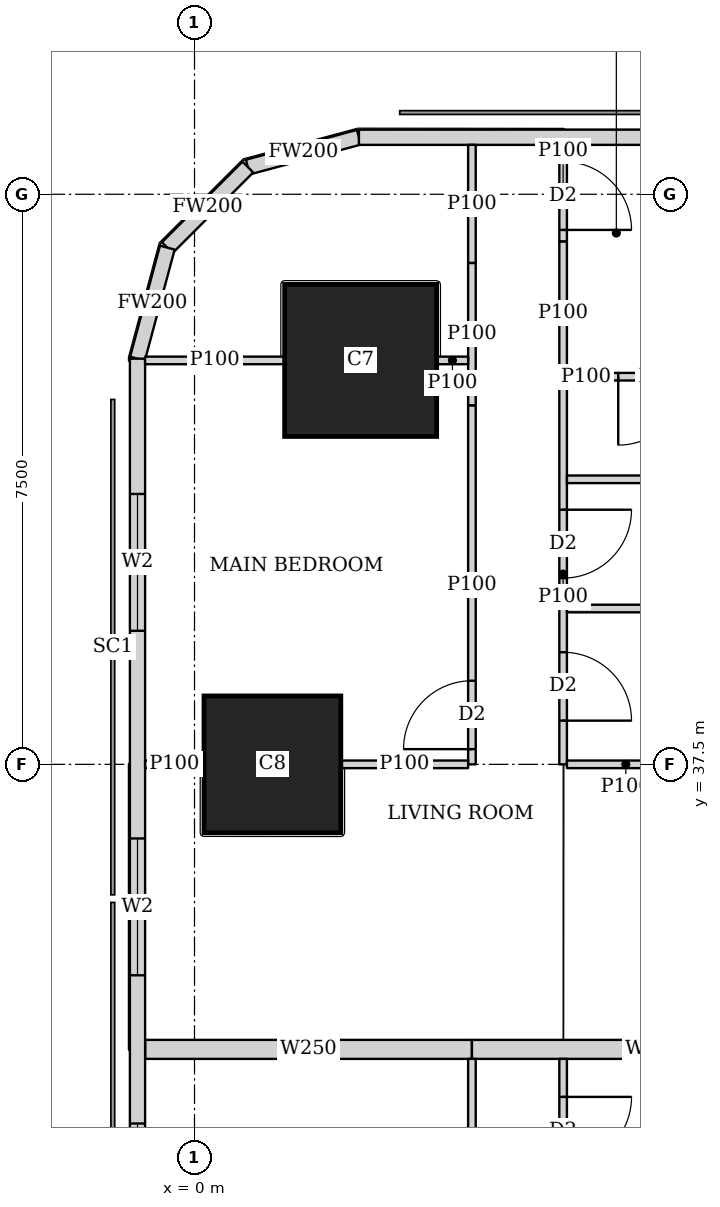
"""IFC4 building model, lengths in metres.
Left out: names, types, materials, properties, quantities, classifications, styles, units other than length and angle.
Written with IfcOpenShell. Run it as: python <this file> out.ifc"""

import sys

from ifc_helpers import new_model, si_unit, direction, frame, frame_2d, origin, origin_2d, place, context, subcontext, project, spatial, rectangle, extrude, element, fill, save


model = new_model("IFC4")
c1 = context("Model", 3, precision=1e-05, world=origin(), true_north=direction((0.0, 1.0)))
c2 = subcontext(c1, "Body", "Model", "MODEL_VIEW")
j1 = project(units=[si_unit("LENGTHUNIT", "METRE"), si_unit("PLANEANGLEUNIT", "RADIAN")], contexts=[c1])
p1 = place(None, origin())
s1 = spatial("IfcSite", under=j1, at=p1, CompositionType="ELEMENT")
p2 = place(p1, origin())
s2 = spatial("IfcBuilding", under=s1, at=p2, CompositionType="ELEMENT")
p3 = place(p2, frame((0.0, 0.0, 184.55)))
s3 = spatial("IfcBuildingStorey", under=s2, at=p3, CompositionType="ELEMENT", Elevation=184.55)
p4 = place(p3, frame((1.025, 37.5, 0.0), z_axis=(0.0, 0.0, 1.0), x_axis=(1.0, 0.0, 0.0)))
e1 = element("IfcColumn", 1, at=p4, inside=s3, PredefinedType="COLUMN", context=c2, shape_type="SweptSolid", body=[
    extrude(rectangle(XDim=1.8, YDim=1.8, at=origin_2d()), origin(), (0.0, 0.0, 1.0), 3.75),
])
p5 = place(p3, frame((2.186, 42.814, 0.0), z_axis=(0.0, 0.0, 1.0), x_axis=(1.0, 0.0, 0.0)))
e2 = element("IfcColumn", 2, at=p5, inside=s3, PredefinedType="COLUMN", context=c2, shape_type="SweptSolid", body=[
    extrude(rectangle(XDim=2.0, YDim=2.0, at=origin_2d()), origin(), (0.0, 0.0, 1.0), 3.75),
])
p6 = place(p3, frame((40.106, 45.75, 0.0), z_axis=(0.0, 0.0, 1.0), x_axis=(-1.0, 0.0, 0.0)))
e3 = element("IfcWall", 3, at=p6, inside=s3, PredefinedType="SOLIDWALL", context=c2, shape_type="SweptSolid", body=[
    extrude(rectangle(XDim=37.943, YDim=0.2, at=frame_2d((18.971, 0.0))), origin(), (0.0, 0.0, 1.0), 3.45),
])
p7 = place(p6, frame((8.606, 0.0, 0.9)))
e4 = element("IfcOpeningElement", 4, at=p7, cuts=e3, PredefinedType="OPENING", context=c2, shape_type="SweptSolid", body=[
    extrude(rectangle(XDim=1.8, YDim=1.5, at=frame_2d((0.9, 0.75))), frame((0.0, 0.11, 0.0), z_axis=(0.0, -1.0, 0.0), x_axis=(1.0, 0.0, 0.0)), (0.0, 0.0, 1.0), 0.22),
])
p8 = place(p6, frame((12.206, 0.0, 0.9)))
e5 = element("IfcOpeningElement", 5, at=p8, cuts=e3, PredefinedType="OPENING", context=c2, shape_type="SweptSolid", body=[
    extrude(rectangle(XDim=1.8, YDim=1.5, at=frame_2d((0.9, 0.75))), frame((0.0, 0.11, 0.0), z_axis=(0.0, -1.0, 0.0), x_axis=(1.0, 0.0, 0.0)), (0.0, 0.0, 1.0), 0.22),
])
p9 = place(p6, frame((15.806, 0.0, 0.9)))
e6 = element("IfcOpeningElement", 6, at=p9, cuts=e3, PredefinedType="OPENING", context=c2, shape_type="SweptSolid", body=[
    extrude(rectangle(XDim=1.8, YDim=1.5, at=frame_2d((0.9, 0.75))), frame((0.0, 0.11, 0.0), z_axis=(0.0, -1.0, 0.0), x_axis=(1.0, 0.0, 0.0)), (0.0, 0.0, 1.0), 0.22),
])
p10 = place(p6, frame((19.406, 0.0, 0.9)))
e7 = element("IfcOpeningElement", 7, at=p10, cuts=e3, PredefinedType="OPENING", context=c2, shape_type="SweptSolid", body=[
    extrude(rectangle(XDim=1.8, YDim=1.5, at=frame_2d((0.9, 0.75))), frame((0.0, 0.11, 0.0), z_axis=(0.0, -1.0, 0.0), x_axis=(1.0, 0.0, 0.0)), (0.0, 0.0, 1.0), 0.22),
])
p11 = place(p6, frame((23.006, 0.0, 0.9)))
e8 = element("IfcOpeningElement", 8, at=p11, cuts=e3, PredefinedType="OPENING", context=c2, shape_type="SweptSolid", body=[
    extrude(rectangle(XDim=1.8, YDim=1.5, at=frame_2d((0.9, 0.75))), frame((0.0, 0.11, 0.0), z_axis=(0.0, -1.0, 0.0), x_axis=(1.0, 0.0, 0.0)), (0.0, 0.0, 1.0), 0.22),
])
p12 = place(p6, frame((26.606, 0.0, 0.9)))
e9 = element("IfcOpeningElement", 9, at=p12, cuts=e3, PredefinedType="OPENING", context=c2, shape_type="SweptSolid", body=[
    extrude(rectangle(XDim=1.8, YDim=1.5, at=frame_2d((0.9, 0.75))), frame((0.0, 0.11, 0.0), z_axis=(0.0, -1.0, 0.0), x_axis=(1.0, 0.0, 0.0)), (0.0, 0.0, 1.0), 0.22),
])
p13 = place(p3, frame((2.163, 45.75, 0.0), z_axis=(0.0, 0.0, 1.0), x_axis=(-0.965832000415, -0.259168954497, 0.0)))
e10 = element("IfcWall", 10, at=p13, inside=s3, PredefinedType="SOLIDWALL", context=c2, shape_type="SweptSolid", body=[
    extrude(rectangle(XDim=1.513, YDim=0.2, at=frame_2d((0.756, 0.0))), origin(), (0.0, 0.0, 1.0), 3.45),
])
p14 = place(p3, frame((0.702, 45.358, 0.0), z_axis=(0.0, 0.0, 1.0), x_axis=(-0.707106781187, -0.707106781187, 0.0)))
e11 = element("IfcWall", 11, at=p14, inside=s3, PredefinedType="SOLIDWALL", context=c2, shape_type="SweptSolid", body=[
    extrude(rectangle(XDim=1.499, YDim=0.2, at=frame_2d((0.75, 0.0))), origin(), (0.0, 0.0, 1.0), 3.45),
])
p15 = place(p3, frame((-0.358, 44.298, 0.0), z_axis=(0.0, 0.0, 1.0), x_axis=(-0.259168954497, -0.965832000415, 0.0)))
e12 = element("IfcWall", 12, at=p15, inside=s3, PredefinedType="SOLIDWALL", context=c2, shape_type="SweptSolid", body=[
    extrude(rectangle(XDim=1.513, YDim=0.2, at=frame_2d((0.756, 0.0))), origin(), (0.0, 0.0, 1.0), 3.45),
])
p16 = place(p3, frame((-0.75, 42.837, 0.0), z_axis=(0.0, 0.0, 1.0), x_axis=(0.0, -1.0, 0.0)))
e13 = element("IfcWall", 13, at=p16, inside=s3, PredefinedType="SOLIDWALL", context=c2, shape_type="SweptSolid", body=[
    extrude(rectangle(XDim=40.674, YDim=0.2, at=frame_2d((20.337, 0.0))), origin(), (0.0, 0.0, 1.0), 3.45),
])
p17 = place(p16, frame((1.78, 0.0, 0.9)))
e14 = element("IfcOpeningElement", 14, at=p17, cuts=e13, PredefinedType="OPENING", context=c2, shape_type="SweptSolid", body=[
    extrude(rectangle(XDim=1.8, YDim=1.5, at=frame_2d((0.9, 0.75))), frame((0.0, 0.11, 0.0), z_axis=(0.0, -1.0, 0.0), x_axis=(1.0, 0.0, 0.0)), (0.0, 0.0, 1.0), 0.22),
])
p18 = place(p16, frame((6.312, 0.0, 0.9)))
e15 = element("IfcOpeningElement", 15, at=p18, cuts=e13, PredefinedType="OPENING", context=c2, shape_type="SweptSolid", body=[
    extrude(rectangle(XDim=1.8, YDim=1.5, at=frame_2d((0.9, 0.75))), frame((0.0, 0.11, 0.0), z_axis=(0.0, -1.0, 0.0), x_axis=(1.0, 0.0, 0.0)), (0.0, 0.0, 1.0), 0.22),
])
p19 = place(p16, frame((10.062, 0.0, 0.9)))
e16 = element("IfcOpeningElement", 16, at=p19, cuts=e13, PredefinedType="OPENING", context=c2, shape_type="SweptSolid", body=[
    extrude(rectangle(XDim=1.8, YDim=1.5, at=frame_2d((0.9, 0.75))), frame((0.0, 0.11, 0.0), z_axis=(0.0, -1.0, 0.0), x_axis=(1.0, 0.0, 0.0)), (0.0, 0.0, 1.0), 0.22),
])
p20 = place(p16, frame((13.812, 0.0, 0.9)))
e17 = element("IfcOpeningElement", 17, at=p20, cuts=e13, PredefinedType="OPENING", context=c2, shape_type="SweptSolid", body=[
    extrude(rectangle(XDim=1.8, YDim=1.5, at=frame_2d((0.9, 0.75))), frame((0.0, 0.11, 0.0), z_axis=(0.0, -1.0, 0.0), x_axis=(1.0, 0.0, 0.0)), (0.0, 0.0, 1.0), 0.22),
])
p21 = place(p16, frame((17.562, 0.0, 0.9)))
e18 = element("IfcOpeningElement", 18, at=p21, cuts=e13, PredefinedType="OPENING", context=c2, shape_type="SweptSolid", body=[
    extrude(rectangle(XDim=1.8, YDim=1.5, at=frame_2d((0.9, 0.75))), frame((0.0, 0.11, 0.0), z_axis=(0.0, -1.0, 0.0), x_axis=(1.0, 0.0, 0.0)), (0.0, 0.0, 1.0), 0.22),
])
p22 = place(p16, frame((21.312, 0.0, 0.9)))
e19 = element("IfcOpeningElement", 19, at=p22, cuts=e13, PredefinedType="OPENING", context=c2, shape_type="SweptSolid", body=[
    extrude(rectangle(XDim=1.8, YDim=1.5, at=frame_2d((0.9, 0.75))), frame((0.0, 0.11, 0.0), z_axis=(0.0, -1.0, 0.0), x_axis=(1.0, 0.0, 0.0)), (0.0, 0.0, 1.0), 0.22),
])
p23 = place(p16, frame((25.062, 0.0, 0.9)))
e20 = element("IfcOpeningElement", 20, at=p23, cuts=e13, PredefinedType="OPENING", context=c2, shape_type="SweptSolid", body=[
    extrude(rectangle(XDim=1.8, YDim=1.5, at=frame_2d((0.9, 0.75))), frame((0.0, 0.11, 0.0), z_axis=(0.0, -1.0, 0.0), x_axis=(1.0, 0.0, 0.0)), (0.0, 0.0, 1.0), 0.22),
])
p24 = place(p16, frame((28.812, 0.0, 0.9)))
e21 = element("IfcOpeningElement", 21, at=p24, cuts=e13, PredefinedType="OPENING", context=c2, shape_type="SweptSolid", body=[
    extrude(rectangle(XDim=1.8, YDim=1.5, at=frame_2d((0.9, 0.75))), frame((0.0, 0.11, 0.0), z_axis=(0.0, -1.0, 0.0), x_axis=(1.0, 0.0, 0.0)), (0.0, 0.0, 1.0), 0.22),
])
p25 = place(p16, frame((32.562, 0.0, 0.9)))
e22 = element("IfcOpeningElement", 22, at=p25, cuts=e13, PredefinedType="OPENING", context=c2, shape_type="SweptSolid", body=[
    extrude(rectangle(XDim=1.8, YDim=1.5, at=frame_2d((0.9, 0.75))), frame((0.0, 0.11, 0.0), z_axis=(0.0, -1.0, 0.0), x_axis=(1.0, 0.0, 0.0)), (0.0, 0.0, 1.0), 0.22),
])
p26 = place(p16, frame((37.094, 0.0, 0.9)))
e23 = element("IfcOpeningElement", 23, at=p26, cuts=e13, PredefinedType="OPENING", context=c2, shape_type="SweptSolid", body=[
    extrude(rectangle(XDim=1.8, YDim=1.5, at=frame_2d((0.9, 0.75))), frame((0.0, 0.11, 0.0), z_axis=(0.0, -1.0, 0.0), x_axis=(1.0, 0.0, 0.0)), (0.0, 0.0, 1.0), 0.22),
])
p27 = place(p3, frame((3.65, 26.25, 0.0), z_axis=(0.0, 0.0, 1.0), x_axis=(0.0, 1.0, 0.0)))
e24 = element("IfcWall", 24, at=p27, inside=s3, PredefinedType="PARTITIONING", context=c2, shape_type="SweptSolid", body=[
    extrude(rectangle(XDim=7.375, YDim=0.1, at=frame_2d((3.688, 0.0))), origin(), (0.0, 0.0, 1.0), 3.45),
])
p28 = place(p27, frame((0.2, 0.0, 0.0)))
e25 = element("IfcOpeningElement", 25, at=p28, cuts=e24, PredefinedType="OPENING", context=c2, shape_type="SweptSolid", body=[
    extrude(rectangle(XDim=0.9, YDim=2.1, at=frame_2d((0.45, 1.05))), frame((0.0, 0.06, 0.0), z_axis=(0.0, -1.0, 0.0), x_axis=(1.0, 0.0, 0.0)), (0.0, 0.0, 1.0), 0.12),
])
p29 = place(p27, frame((3.95, 0.0, 0.0)))
e26 = element("IfcOpeningElement", 26, at=p29, cuts=e24, PredefinedType="OPENING", context=c2, shape_type="SweptSolid", body=[
    extrude(rectangle(XDim=0.9, YDim=2.1, at=frame_2d((0.45, 1.05))), frame((0.0, 0.06, 0.0), z_axis=(0.0, -1.0, 0.0), x_axis=(1.0, 0.0, 0.0)), (0.0, 0.0, 1.0), 0.12),
])
p30 = place(p3, frame((4.85, 26.25, 0.0), z_axis=(0.0, 0.0, 1.0), x_axis=(0.0, 1.0, 0.0)))
e27 = element("IfcWall", 27, at=p30, inside=s3, PredefinedType="PARTITIONING", context=c2, shape_type="SweptSolid", body=[
    extrude(rectangle(XDim=7.375, YDim=0.1, at=frame_2d((3.688, 0.0))), origin(), (0.0, 0.0, 1.0), 3.45),
])
p31 = place(p30, frame((0.575, 0.0, 0.0)))
e28 = element("IfcOpeningElement", 28, at=p31, cuts=e27, PredefinedType="OPENING", context=c2, shape_type="SweptSolid", body=[
    extrude(rectangle(XDim=0.9, YDim=2.1, at=frame_2d((0.45, 1.05))), frame((0.0, 0.06, 0.0), z_axis=(0.0, -1.0, 0.0), x_axis=(1.0, 0.0, 0.0)), (0.0, 0.0, 1.0), 0.12),
])
p32 = place(p30, frame((4.1, 0.0, 0.0)))
e29 = element("IfcOpeningElement", 29, at=p32, cuts=e27, PredefinedType="OPENING", context=c2, shape_type="SweptSolid", body=[
    extrude(rectangle(XDim=0.9, YDim=2.1, at=frame_2d((0.45, 1.05))), frame((0.0, 0.06, 0.0), z_axis=(0.0, -1.0, 0.0), x_axis=(1.0, 0.0, 0.0)), (0.0, 0.0, 1.0), 0.12),
])
p33 = place(p30, frame((2.45, 0.0, 0.0)))
e30 = element("IfcOpeningElement", 30, at=p33, cuts=e27, PredefinedType="OPENING", context=c2, shape_type="SweptSolid", body=[
    extrude(rectangle(XDim=0.9, YDim=2.1, at=frame_2d((0.45, 1.05))), frame((0.0, 0.06, 0.0), z_axis=(0.0, -1.0, 0.0), x_axis=(1.0, 0.0, 0.0)), (0.0, 0.0, 1.0), 0.12),
])
p34 = place(p30, frame((5.975, 0.0, 0.0)))
e31 = element("IfcOpeningElement", 31, at=p34, cuts=e27, PredefinedType="OPENING", context=c2, shape_type="SweptSolid", body=[
    extrude(rectangle(XDim=0.9, YDim=2.1, at=frame_2d((0.45, 1.05))), frame((0.0, 0.06, 0.0), z_axis=(0.0, -1.0, 0.0), x_axis=(1.0, 0.0, 0.0)), (0.0, 0.0, 1.0), 0.12),
])
p35 = place(p3, frame((3.65, 37.5, 0.0), z_axis=(0.0, 0.0, 1.0), x_axis=(0.0, 1.0, 0.0)))
e32 = element("IfcWall", 32, at=p35, inside=s3, PredefinedType="PARTITIONING", context=c2, shape_type="SweptSolid", body=[
    extrude(rectangle(XDim=4.724, YDim=0.1, at=frame_2d((2.362, 0.0))), origin(), (0.0, 0.0, 1.0), 3.45),
])
p36 = place(p35, frame((0.2, 0.0, 0.0)))
e33 = element("IfcOpeningElement", 33, at=p36, cuts=e32, PredefinedType="OPENING", context=c2, shape_type="SweptSolid", body=[
    extrude(rectangle(XDim=0.9, YDim=2.1, at=frame_2d((0.45, 1.05))), frame((0.0, 0.06, 0.0), z_axis=(0.0, -1.0, 0.0), x_axis=(1.0, 0.0, 0.0)), (0.0, 0.0, 1.0), 0.12),
])
p37 = place(p3, frame((3.65, 42.224, 0.0), z_axis=(0.0, 0.0, 1.0), x_axis=(0.0, 1.0, 0.0)))
e34 = element("IfcWall", 34, at=p37, inside=s3, PredefinedType="PARTITIONING", context=c2, shape_type="SweptSolid", body=[
    extrude(rectangle(XDim=1.873, YDim=0.1, at=frame_2d((0.937, 0.0))), origin(), (0.0, 0.0, 1.0), 2.05),
])
p38 = place(p3, frame((3.65, 44.097, 0.0), z_axis=(0.0, 0.0, 1.0), x_axis=(0.0, 1.0, 0.0)))
e35 = element("IfcWall", 35, at=p38, inside=s3, PredefinedType="PARTITIONING", context=c2, shape_type="SweptSolid", body=[
    extrude(rectangle(XDim=1.553, YDim=0.1, at=frame_2d((0.776, 0.0))), origin(), (0.0, 0.0, 1.0), 3.45),
])
p39 = place(p3, frame((4.85, 37.5, 0.0), z_axis=(0.0, 0.0, 1.0), x_axis=(0.0, 1.0, 0.0)))
e36 = element("IfcWall", 36, at=p39, inside=s3, PredefinedType="PARTITIONING", context=c2, shape_type="SweptSolid", body=[
    extrude(rectangle(XDim=5.007, YDim=0.1, at=frame_2d((2.503, 0.0))), origin(), (0.0, 0.0, 1.0), 3.45),
])
p40 = place(p39, frame((0.575, 0.0, 0.0)))
e37 = element("IfcOpeningElement", 37, at=p40, cuts=e36, PredefinedType="OPENING", context=c2, shape_type="SweptSolid", body=[
    extrude(rectangle(XDim=0.9, YDim=2.1, at=frame_2d((0.45, 1.05))), frame((0.0, 0.06, 0.0), z_axis=(0.0, -1.0, 0.0), x_axis=(1.0, 0.0, 0.0)), (0.0, 0.0, 1.0), 0.12),
])
p41 = place(p39, frame((2.45, 0.0, 0.0)))
e38 = element("IfcOpeningElement", 38, at=p41, cuts=e36, PredefinedType="OPENING", context=c2, shape_type="SweptSolid", body=[
    extrude(rectangle(XDim=0.9, YDim=2.1, at=frame_2d((0.45, 1.05))), frame((0.0, 0.06, 0.0), z_axis=(0.0, -1.0, 0.0), x_axis=(1.0, 0.0, 0.0)), (0.0, 0.0, 1.0), 0.12),
])
p42 = place(p3, frame((4.85, 42.507, 0.0), z_axis=(0.0, 0.0, 1.0), x_axis=(0.0, 1.0, 0.0)))
e39 = element("IfcWall", 39, at=p42, inside=s3, PredefinedType="PARTITIONING", context=c2, shape_type="SweptSolid", body=[
    extrude(rectangle(XDim=1.874, YDim=0.1, at=frame_2d((0.937, 0.0))), origin(), (0.0, 0.0, 1.0), 2.05),
])
p43 = place(p3, frame((4.85, 44.381, 0.0), z_axis=(0.0, 0.0, 1.0), x_axis=(0.0, 1.0, 0.0)))
e40 = element("IfcWall", 40, at=p43, inside=s3, PredefinedType="PARTITIONING", context=c2, shape_type="SweptSolid", body=[
    extrude(rectangle(XDim=1.269, YDim=0.1, at=frame_2d((0.634, 0.0))), origin(), (0.0, 0.0, 1.0), 3.45),
])
p44 = place(p43, frame((0.15, 0.0, 0.0)))
e41 = element("IfcOpeningElement", 41, at=p44, cuts=e40, PredefinedType="OPENING", context=c2, shape_type="SweptSolid", body=[
    extrude(rectangle(XDim=0.9, YDim=2.1, at=frame_2d((0.45, 1.05))), frame((0.0, 0.06, 0.0), z_axis=(0.0, -1.0, 0.0), x_axis=(1.0, 0.0, 0.0)), (0.0, 0.0, 1.0), 0.12),
])
p45 = place(p3, frame((-0.65, 37.5, 0.0), z_axis=(0.0, 0.0, 1.0), x_axis=(1.0, 0.0, 0.0)))
e42 = element("IfcWall", 42, at=p45, inside=s3, PredefinedType="PARTITIONING", context=c2, shape_type="SweptSolid", body=[
    extrude(rectangle(XDim=0.774, YDim=0.1, at=frame_2d((0.387, 0.0))), origin(), (0.0, 0.0, 1.0), 3.45),
])
p46 = place(p3, frame((1.926, 37.5, 0.0), z_axis=(0.0, 0.0, 1.0), x_axis=(1.0, 0.0, 0.0)))
e43 = element("IfcWall", 43, at=p46, inside=s3, PredefinedType="PARTITIONING", context=c2, shape_type="SweptSolid", body=[
    extrude(rectangle(XDim=1.674, YDim=0.1, at=frame_2d((0.837, 0.0))), origin(), (0.0, 0.0, 1.0), 2.05),
])
p47 = place(p3, frame((-0.65, 42.814, 0.0), z_axis=(0.0, 0.0, 1.0), x_axis=(1.0, 0.0, 0.0)))
e44 = element("IfcWall", 44, at=p47, inside=s3, PredefinedType="PARTITIONING", context=c2, shape_type="SweptSolid", body=[
    extrude(rectangle(XDim=1.835, YDim=0.1, at=frame_2d((0.917, 0.0))), origin(), (0.0, 0.0, 1.0), 3.45),
])
p48 = place(p3, frame((3.187, 42.814, 0.0), z_axis=(0.0, 0.0, 1.0), x_axis=(1.0, 0.0, 0.0)))
e45 = element("IfcWall", 45, at=p48, inside=s3, PredefinedType="PARTITIONING", context=c2, shape_type="SweptSolid", body=[
    extrude(rectangle(XDim=0.413, YDim=0.1, at=frame_2d((0.207, 0.0))), origin(), (0.0, 0.0, 1.0), 2.05),
])
p49 = place(p3, frame((4.9, 37.5, 0.0), z_axis=(0.0, 0.0, 1.0), x_axis=(1.0, 0.0, 0.0)))
e46 = element("IfcWall", 46, at=p49, inside=s3, PredefinedType="PARTITIONING", context=c2, shape_type="SweptSolid", body=[
    extrude(rectangle(XDim=1.549, YDim=0.1, at=frame_2d((0.774, 0.0))), origin(), (0.0, 0.0, 1.0), 3.45),
])
for number, where, z_axis, x_axis in (
    (47, (4.9, 41.25, 0.0), (0.0, 0.0, 1.0), (1.0, 0.0, 0.0)),
    (48, (4.9, 39.55, 0.0), (0.0, 0.0, 1.0), (1.0, 0.0, 0.0)),
):
    element("IfcWall", number, at=place(p3, frame(where, z_axis=z_axis, x_axis=x_axis)), inside=s3, PredefinedType="PARTITIONING", context=c2, shape_type="SweptSolid", body=[
        extrude(rectangle(XDim=3.525, YDim=0.1, at=frame_2d((1.763, 0.0))), origin(), (0.0, 0.0, 1.0), 3.45),
    ])
p50 = place(p3, frame((-0.65, 33.75, 0.0), z_axis=(0.0, 0.0, 1.0), x_axis=(1.0, 0.0, 0.0)))
e49 = element("IfcWall", 49, at=p50, inside=s3, PredefinedType="SOLIDWALL", context=c2, shape_type="SweptSolid", body=[
    extrude(rectangle(XDim=4.3, YDim=0.25, at=frame_2d((2.15, 0.0))), origin(), (0.0, 0.0, 1.0), 2.05),
])
p51 = place(p3, frame((3.65, 33.75, 0.0), z_axis=(0.0, 0.0, 1.0), x_axis=(1.0, 0.0, 0.0)))
e50 = element("IfcWall", 50, at=p51, inside=s3, PredefinedType="SOLIDWALL", context=c2, shape_type="SweptSolid", body=[
    extrude(rectangle(XDim=4.775, YDim=0.25, at=frame_2d((2.388, 0.0))), origin(), (0.0, 0.0, 1.0), 3.45),
])
p52 = place(p3, frame((8.425, 42.6, 0.0), z_axis=(0.0, 0.0, 1.0), x_axis=(-1.0, 0.0, 0.0)))
e51 = element("IfcWall", 51, at=p52, inside=s3, PredefinedType="PARTITIONING", context=c2, shape_type="SweptSolid", body=[
    extrude(rectangle(XDim=3.022, YDim=0.1, at=frame_2d((1.511, 0.0))), origin(), (0.0, 0.0, 1.0), 3.45),
])
p53 = place(p52, frame((1.95, 0.0, 0.0)))
e52 = element("IfcOpeningElement", 52, at=p53, cuts=e51, PredefinedType="OPENING", context=c2, shape_type="SweptSolid", body=[
    extrude(rectangle(XDim=0.9, YDim=2.1, at=frame_2d((0.45, 1.05))), frame((0.0, 0.06, 0.0), z_axis=(0.0, -1.0, 0.0), x_axis=(1.0, 0.0, 0.0)), (0.0, 0.0, 1.0), 0.12),
])
p54 = place(p3, frame((5.403, 42.6, 0.0), z_axis=(0.0, 0.0, 1.0), x_axis=(-1.0, 0.0, 0.0)))
e53 = element("IfcWall", 53, at=p54, inside=s3, PredefinedType="PARTITIONING", context=c2, shape_type="SweptSolid", body=[
    extrude(rectangle(XDim=0.503, YDim=0.1, at=frame_2d((0.251, 0.0))), origin(), (0.0, 0.0, 1.0), 2.05),
])
p55 = place(p17, origin())
e54 = element("IfcWindow", 54, at=p55, inside=s3, PartitioningType="SINGLE_PANEL", PredefinedType="WINDOW", context=c2, shape_type="SweptSolid", body=[
    extrude(rectangle(XDim=1.8, YDim=1.5, at=frame_2d((0.9, 0.75))), frame((0.0, 0.03, 0.0), z_axis=(0.0, -1.0, 0.0), x_axis=(1.0, 0.0, 0.0)), (0.0, 0.0, 1.0), 0.06),
])
fill(e14, e54)
p56 = place(p18, origin())
e55 = element("IfcWindow", 55, at=p56, inside=s3, PartitioningType="SINGLE_PANEL", PredefinedType="WINDOW", context=c2, shape_type="SweptSolid", body=[
    extrude(rectangle(XDim=1.8, YDim=1.5, at=frame_2d((0.9, 0.75))), frame((0.0, 0.03, 0.0), z_axis=(0.0, -1.0, 0.0), x_axis=(1.0, 0.0, 0.0)), (0.0, 0.0, 1.0), 0.06),
])
fill(e15, e55)
p57 = place(p19, origin())
e56 = element("IfcWindow", 56, at=p57, inside=s3, PartitioningType="SINGLE_PANEL", PredefinedType="WINDOW", context=c2, shape_type="SweptSolid", body=[
    extrude(rectangle(XDim=1.8, YDim=1.5, at=frame_2d((0.9, 0.75))), frame((0.0, 0.03, 0.0), z_axis=(0.0, -1.0, 0.0), x_axis=(1.0, 0.0, 0.0)), (0.0, 0.0, 1.0), 0.06),
])
fill(e16, e56)
p58 = place(p34, origin())
e57 = element("IfcDoor", 57, at=p58, inside=s3, OperationType="SINGLE_SWING_LEFT", PredefinedType="DOOR", context=c2, shape_type="SweptSolid", body=[
    extrude(rectangle(XDim=0.9, YDim=2.1, at=frame_2d((0.45, 1.05))), frame((0.0, 0.025, 0.0), z_axis=(0.0, -1.0, 0.0), x_axis=(1.0, 0.0, 0.0)), (0.0, 0.0, 1.0), 0.05),
])
fill(e31, e57)
p59 = place(p36, origin())
e58 = element("IfcDoor", 58, at=p59, inside=s3, OperationType="SINGLE_SWING_LEFT", PredefinedType="DOOR", context=c2, shape_type="SweptSolid", body=[
    extrude(rectangle(XDim=0.9, YDim=2.1, at=frame_2d((0.45, 1.05))), frame((0.0, 0.025, 0.0), z_axis=(0.0, -1.0, 0.0), x_axis=(1.0, 0.0, 0.0)), (0.0, 0.0, 1.0), 0.05),
])
fill(e33, e58)
p60 = place(p40, origin())
e59 = element("IfcDoor", 59, at=p60, inside=s3, OperationType="SINGLE_SWING_RIGHT", PredefinedType="DOOR", context=c2, shape_type="SweptSolid", body=[
    extrude(rectangle(XDim=0.9, YDim=2.1, at=frame_2d((0.45, 1.05))), frame((0.0, 0.025, 0.0), z_axis=(0.0, -1.0, 0.0), x_axis=(1.0, 0.0, 0.0)), (0.0, 0.0, 1.0), 0.05),
])
fill(e37, e59)
p61 = place(p44, origin())
e60 = element("IfcDoor", 60, at=p61, inside=s3, OperationType="SINGLE_SWING_RIGHT", PredefinedType="DOOR", context=c2, shape_type="SweptSolid", body=[
    extrude(rectangle(XDim=0.9, YDim=2.1, at=frame_2d((0.45, 1.05))), frame((0.0, 0.025, 0.0), z_axis=(0.0, -1.0, 0.0), x_axis=(1.0, 0.0, 0.0)), (0.0, 0.0, 1.0), 0.05),
])
fill(e41, e60)
p62 = place(p41, origin())
e61 = element("IfcDoor", 61, at=p62, inside=s3, OperationType="SINGLE_SWING_LEFT", PredefinedType="DOOR", context=c2, shape_type="SweptSolid", body=[
    extrude(rectangle(XDim=0.9, YDim=2.1, at=frame_2d((0.45, 1.05))), frame((0.0, 0.025, 0.0), z_axis=(0.0, -1.0, 0.0), x_axis=(1.0, 0.0, 0.0)), (0.0, 0.0, 1.0), 0.05),
])
fill(e38, e61)
p63 = place(p53, origin())
e62 = element("IfcDoor", 62, at=p63, inside=s3, OperationType="SINGLE_SWING_RIGHT", PredefinedType="DOOR", context=c2, shape_type="SweptSolid", body=[
    extrude(rectangle(XDim=0.9, YDim=2.1, at=frame_2d((0.45, 1.05))), frame((0.0, 0.025, 0.0), z_axis=(0.0, -1.0, 0.0), x_axis=(1.0, 0.0, 0.0)), (0.0, 0.0, 1.0), 0.05),
])
fill(e52, e62)
save(model, sys.argv[1])
